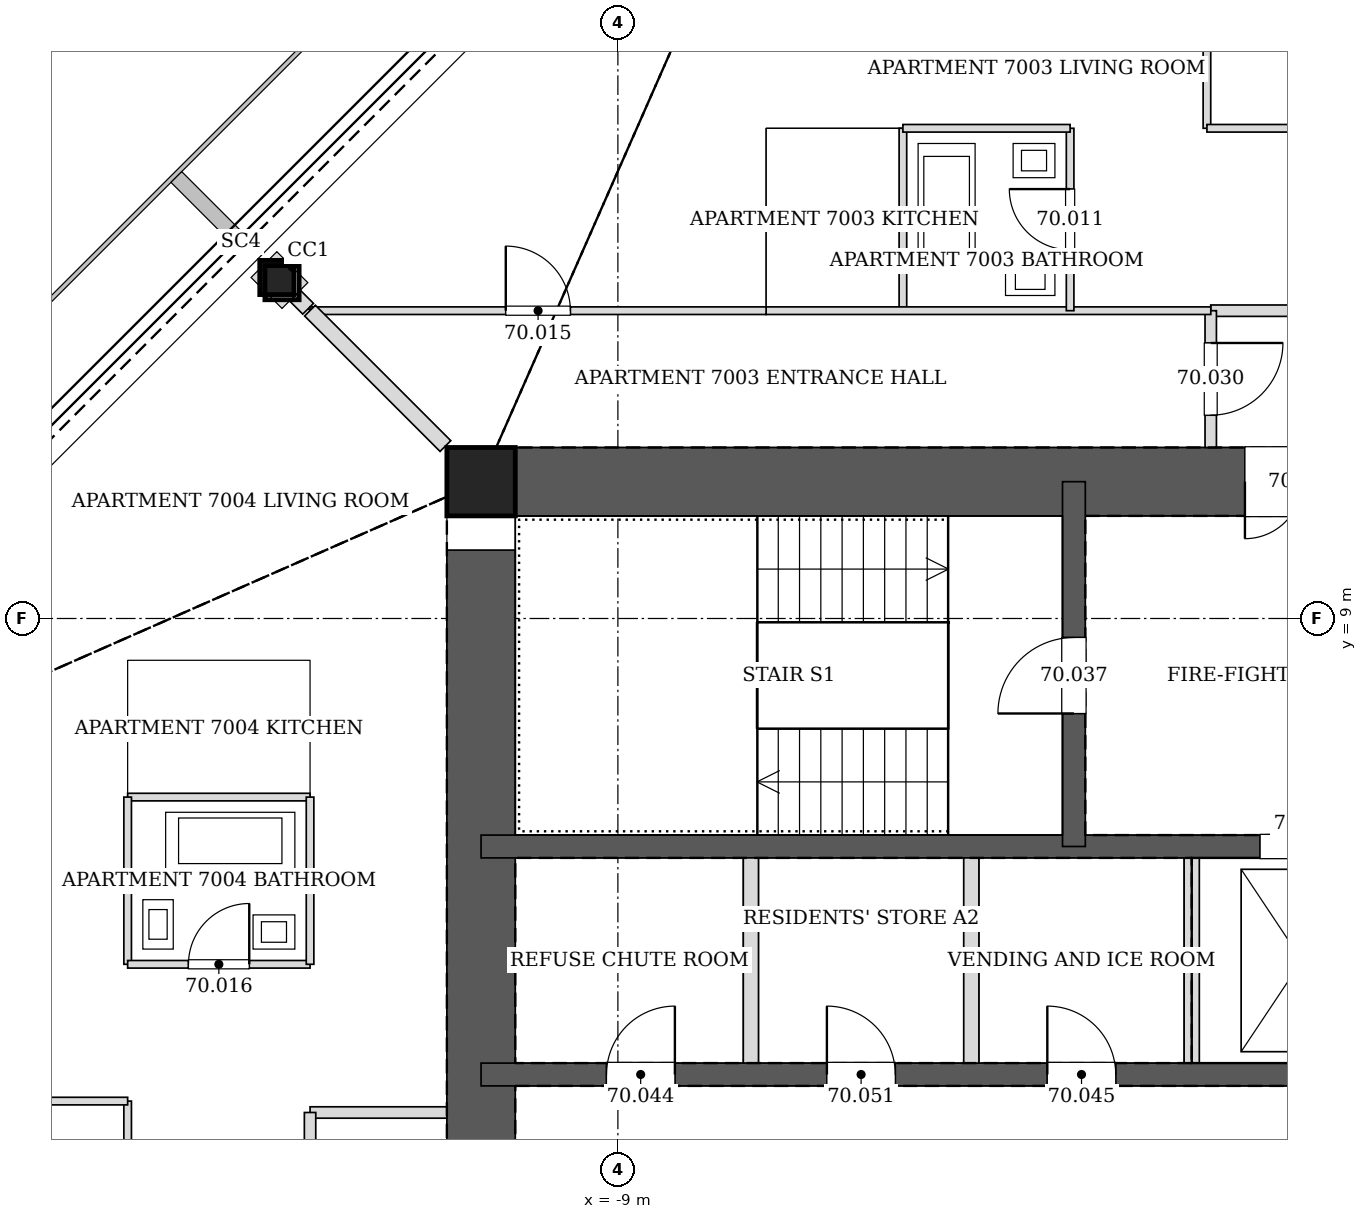
"""IFC4 building model, lengths in metres.
Left out: names, types, materials, properties, quantities, classifications, styles, units other than length and angle.
Written with IfcOpenShell. Run it as: python <this file> out.ifc"""

import sys

from ifc_helpers import new_model, si_unit, direction, frame, frame_2d, origin, origin_2d, place, context, subcontext, project, spatial, rectangle, hollow_rectangle, extrude, element, fill, save


model = new_model("IFC4")
c1 = context("Model", 3, precision=1e-05, world=origin(), true_north=direction((0.0, 1.0)))
c2 = subcontext(c1, "Body", "Model", "MODEL_VIEW")
j1 = project(units=[si_unit("LENGTHUNIT", "METRE"), si_unit("PLANEANGLEUNIT", "RADIAN")], contexts=[c1])
p1 = place(None, origin())
s1 = spatial("IfcSite", under=j1, at=p1, CompositionType="ELEMENT")
p2 = place(p1, origin())
s2 = spatial("IfcBuilding", under=s1, at=p2, CompositionType="ELEMENT")
p3 = place(p2, frame((0.0, 0.0, 287.8)))
s3 = spatial("IfcBuildingStorey", under=s2, at=p3, CompositionType="ELEMENT", Elevation=287.8)
p4 = place(p3, frame((-13.487, 13.487, 0.0), z_axis=(0.01995470925, -0.01995470925, 0.999601730269), x_axis=(0.707106781187, 0.707106781187, 0.0)))
e1 = element("IfcColumn", 1, at=p4, inside=s3, PredefinedType="COLUMN", context=c2, shape_type="SweptSolid", body=[
    extrude(hollow_rectangle(XDim=0.45, YDim=0.45, WallThickness=0.02, at=origin_2d()), origin(), (0.0, 0.0, 1.0), 3.401),
])
p5 = place(p3, frame((-10.8, 10.8, 0.0), z_axis=(0.0, 0.0, 1.0), x_axis=(1.0, 0.0, 0.0)))
e2 = element("IfcColumn", 2, at=p5, inside=s3, PredefinedType="COLUMN", context=c2, shape_type="SweptSolid", body=[
    extrude(hollow_rectangle(XDim=0.9, YDim=0.9, WallThickness=0.04, at=origin_2d()), origin(), (0.0, 0.0, 1.0), 3.4),
])
p6 = place(p3, frame((10.8, 10.8, 0.0), z_axis=(0.0, 0.0, 1.0), x_axis=(-1.0, 0.0, 0.0)))
e3 = element("IfcWall", 3, at=p6, inside=s3, PredefinedType="SOLIDWALL", context=c2, shape_type="SweptSolid", body=[
    extrude(rectangle(XDim=21.6, YDim=0.9, at=frame_2d((10.8, 0.0))), origin(), (0.0, 0.0, 1.0), 3.4),
])
p7 = place(p6, frame((10.05, 0.0, 0.0)))
e4 = element("IfcOpeningElement", 4, at=p7, cuts=e3, PredefinedType="OPENING", context=c2, shape_type="SweptSolid", body=[
    extrude(rectangle(XDim=1.5, YDim=2.1, at=frame_2d((0.75, 1.05))), frame((0.0, 0.46, 0.0), z_axis=(0.0, -1.0, 0.0), x_axis=(1.0, 0.0, 0.0)), (0.0, 0.0, 1.0), 0.92),
])
p8 = place(p3, frame((-10.8, 10.8, 0.0), z_axis=(0.0, 0.0, 1.0), x_axis=(0.0, -1.0, 0.0)))
e5 = element("IfcWall", 5, at=p8, inside=s3, PredefinedType="SOLIDWALL", context=c2, shape_type="SweptSolid", body=[
    extrude(rectangle(XDim=21.6, YDim=0.9, at=frame_2d((10.8, 0.0))), origin(), (0.0, 0.0, 1.0), 3.4),
])
p9 = place(p8, frame((8.7, 0.0, 0.0)))
e6 = element("IfcOpeningElement", 6, at=p9, cuts=e5, PredefinedType="OPENING", context=c2, shape_type="SweptSolid", body=[
    extrude(rectangle(XDim=1.2, YDim=2.1, at=frame_2d((0.6, 1.05))), frame((0.0, 0.46, 0.0), z_axis=(0.0, -1.0, 0.0), x_axis=(1.0, 0.0, 0.0)), (0.0, 0.0, 1.0), 0.92),
])
p10 = place(p8, frame((11.7, 0.0, 0.0)))
e7 = element("IfcOpeningElement", 7, at=p10, cuts=e5, PredefinedType="OPENING", context=c2, shape_type="SweptSolid", body=[
    extrude(rectangle(XDim=1.2, YDim=2.1, at=frame_2d((0.6, 1.05))), frame((0.0, 0.46, 0.0), z_axis=(0.0, -1.0, 0.0), x_axis=(1.0, 0.0, 0.0)), (0.0, 0.0, 1.0), 0.92),
])
p11 = place(p3, frame((-10.8, 3.0, 0.0), z_axis=(0.0, 0.0, 1.0), x_axis=(1.0, 0.0, 0.0)))
e8 = element("IfcWall", 8, at=p11, inside=s3, PredefinedType="SOLIDWALL", context=c2, shape_type="SweptSolid", body=[
    extrude(rectangle(XDim=21.6, YDim=0.3, at=frame_2d((10.8, 0.0))), origin(), (0.0, 0.0, 1.0), 3.4),
])
p12 = place(p11, frame((1.65, 0.0, 0.0)))
e9 = element("IfcOpeningElement", 9, at=p12, cuts=e8, PredefinedType="OPENING", context=c2, shape_type="SweptSolid", body=[
    extrude(rectangle(XDim=0.9, YDim=2.1, at=frame_2d((0.45, 1.05))), frame((0.0, 0.16, 0.0), z_axis=(0.0, -1.0, 0.0), x_axis=(1.0, 0.0, 0.0)), (0.0, 0.0, 1.0), 0.32),
])
p13 = place(p11, frame((7.45, 0.0, 0.0)))
e10 = element("IfcOpeningElement", 10, at=p13, cuts=e8, PredefinedType="OPENING", context=c2, shape_type="SweptSolid", body=[
    extrude(rectangle(XDim=0.9, YDim=2.1, at=frame_2d((0.45, 1.05))), frame((0.0, 0.16, 0.0), z_axis=(0.0, -1.0, 0.0), x_axis=(1.0, 0.0, 0.0)), (0.0, 0.0, 1.0), 0.32),
])
p14 = place(p11, frame((13.25, 0.0, 0.0)))
e11 = element("IfcOpeningElement", 11, at=p14, cuts=e8, PredefinedType="OPENING", context=c2, shape_type="SweptSolid", body=[
    extrude(rectangle(XDim=0.9, YDim=2.1, at=frame_2d((0.45, 1.05))), frame((0.0, 0.16, 0.0), z_axis=(0.0, -1.0, 0.0), x_axis=(1.0, 0.0, 0.0)), (0.0, 0.0, 1.0), 0.32),
])
p15 = place(p11, frame((16.15, 0.0, 0.0)))
e12 = element("IfcOpeningElement", 12, at=p15, cuts=e8, PredefinedType="OPENING", context=c2, shape_type="SweptSolid", body=[
    extrude(rectangle(XDim=0.9, YDim=2.1, at=frame_2d((0.45, 1.05))), frame((0.0, 0.16, 0.0), z_axis=(0.0, -1.0, 0.0), x_axis=(1.0, 0.0, 0.0)), (0.0, 0.0, 1.0), 0.32),
])
p16 = place(p11, frame((19.05, 0.0, 0.0)))
e13 = element("IfcOpeningElement", 13, at=p16, cuts=e8, PredefinedType="OPENING", context=c2, shape_type="SweptSolid", body=[
    extrude(rectangle(XDim=0.9, YDim=2.1, at=frame_2d((0.45, 1.05))), frame((0.0, 0.16, 0.0), z_axis=(0.0, -1.0, 0.0), x_axis=(1.0, 0.0, 0.0)), (0.0, 0.0, 1.0), 0.32),
])
p17 = place(p11, frame((4.55, 0.0, 0.0)))
e14 = element("IfcOpeningElement", 14, at=p17, cuts=e8, PredefinedType="OPENING", context=c2, shape_type="SweptSolid", body=[
    extrude(rectangle(XDim=0.9, YDim=2.1, at=frame_2d((0.45, 1.05))), frame((0.0, 0.16, 0.0), z_axis=(0.0, -1.0, 0.0), x_axis=(1.0, 0.0, 0.0)), (0.0, 0.0, 1.0), 0.32),
])
p18 = place(p3, frame((-10.8, 6.0, 0.0), z_axis=(0.0, 0.0, 1.0), x_axis=(1.0, 0.0, 0.0)))
e15 = element("IfcWall", 15, at=p18, inside=s3, PredefinedType="SOLIDWALL", context=c2, shape_type="SweptSolid", body=[
    extrude(rectangle(XDim=21.6, YDim=0.3, at=frame_2d((10.8, 0.0))), origin(), (0.0, 0.0, 1.0), 3.4),
])
p19 = place(p18, frame((10.25, 0.0, 0.0)))
e16 = element("IfcOpeningElement", 16, at=p19, cuts=e15, PredefinedType="OPENING", context=c2, shape_type="SweptSolid", body=[
    extrude(rectangle(XDim=1.1, YDim=2.1, at=frame_2d((0.55, 1.05))), frame((0.0, 0.16, 0.0), z_axis=(0.0, -1.0, 0.0), x_axis=(1.0, 0.0, 0.0)), (0.0, 0.0, 1.0), 0.32),
])
p20 = place(p3, frame((-3.0, 6.0, 0.0), z_axis=(0.0, 0.0, 1.0), x_axis=(0.0, 1.0, 0.0)))
e17 = element("IfcWall", 17, at=p20, inside=s3, PredefinedType="SOLIDWALL", context=c2, shape_type="SweptSolid", body=[
    extrude(rectangle(XDim=4.8, YDim=0.3, at=frame_2d((2.4, 0.0))), origin(), (0.0, 0.0, 1.0), 3.4),
])
p21 = place(p20, frame((1.75, 0.0, 0.0)))
e18 = element("IfcOpeningElement", 18, at=p21, cuts=e17, PredefinedType="OPENING", context=c2, shape_type="SweptSolid", body=[
    extrude(rectangle(XDim=1.0, YDim=2.1, at=frame_2d((0.5, 1.05))), frame((0.0, 0.16, 0.0), z_axis=(0.0, -1.0, 0.0), x_axis=(1.0, 0.0, 0.0)), (0.0, 0.0, 1.0), 0.32),
])
p22 = place(p3, frame((6.751, 13.05, 0.0), z_axis=(0.0, 0.0, 1.0), x_axis=(-1.0, 0.0, 0.0)))
e19 = element("IfcWall", 19, at=p22, inside=s3, PredefinedType="PARTITIONING", context=c2, shape_type="SweptSolid", body=[
    extrude(rectangle(XDim=7.951, YDim=0.15, at=frame_2d((3.976, 0.0))), origin(), (0.0, 0.0, 1.0), 2.349),
])
p23 = place(p3, frame((-1.2, 13.05, 0.0), z_axis=(0.0, 0.0, 1.0), x_axis=(0.0, -1.0, 0.0)))
e20 = element("IfcWall", 20, at=p23, inside=s3, PredefinedType="PARTITIONING", context=c2, shape_type="SweptSolid", body=[
    extrude(rectangle(XDim=1.8, YDim=0.15, at=frame_2d((0.9, 0.0))), origin(), (0.0, 0.0, 1.0), 3.2),
])
p24 = place(p23, frame((0.425, 0.0, 0.0)))
e21 = element("IfcOpeningElement", 21, at=p24, cuts=e20, PredefinedType="OPENING", context=c2, shape_type="SweptSolid", body=[
    extrude(rectangle(XDim=0.95, YDim=2.1, at=frame_2d((0.475, 1.05))), frame((0.0, 0.085, 0.0), z_axis=(0.0, -1.0, 0.0), x_axis=(1.0, 0.0, 0.0)), (0.0, 0.0, 1.0), 0.17),
])
p25 = place(p3, frame((-11.25, 2.5, 0.0), z_axis=(0.0, 0.0, 1.0), x_axis=(-1.0, 0.0, 0.0)))
e22 = element("IfcWall", 22, at=p25, inside=s3, PredefinedType="PARTITIONING", context=c2, shape_type="SweptSolid", body=[
    extrude(rectangle(XDim=1.8, YDim=0.15, at=frame_2d((0.9, 0.0))), origin(), (0.0, 0.0, 1.0), 3.2),
])
p26 = place(p3, frame((-13.05, 2.5, 0.0), z_axis=(0.0, 0.0, 1.0), x_axis=(0.0, -1.0, 0.0)))
e23 = element("IfcWall", 23, at=p26, inside=s3, PredefinedType="PARTITIONING", context=c2, shape_type="SweptSolid", body=[
    extrude(rectangle(XDim=3.251, YDim=0.15, at=frame_2d((1.625, 0.0))), origin(), (0.0, 0.0, 1.0), 2.349),
])
p27 = place(p26, frame((1.15, 0.0, 0.0)))
e24 = element("IfcOpeningElement", 24, at=p27, cuts=e23, PredefinedType="OPENING", context=c2, shape_type="SweptSolid", body=[
    extrude(rectangle(XDim=0.95, YDim=2.1, at=frame_2d((0.475, 1.05))), frame((0.0, 0.085, 0.0), z_axis=(0.0, -1.0, 0.0), x_axis=(1.0, 0.0, 0.0)), (0.0, 0.0, 1.0), 0.17),
])
p28 = place(p3, frame((-5.25, 13.05, 0.0), z_axis=(0.0, 0.0, 1.0), x_axis=(0.0, 1.0, 0.0)))
e25 = element("IfcWall", 25, at=p28, inside=s3, PredefinedType="PARTITIONING", context=c2, shape_type="SweptSolid", body=[
    extrude(rectangle(XDim=2.4, YDim=0.1, at=frame_2d((1.2, 0.0))), origin(), (0.0, 0.0, 1.0), 2.591),
])
p29 = place(p3, frame((-7.05, 13.05, 0.0), z_axis=(0.0, 0.0, 1.0), x_axis=(1.0, 0.0, 0.0)))
e26 = element("IfcWall", 26, at=p29, inside=s3, PredefinedType="PARTITIONING", context=c2, shape_type="SweptSolid", body=[
    extrude(rectangle(XDim=5.851, YDim=0.1, at=frame_2d((2.926, 0.0))), origin(), (0.0, 0.0, 1.0), 3.2),
])
p30 = place(p3, frame((-3.05, 13.05, 0.0), z_axis=(0.0, 0.0, 1.0), x_axis=(0.0, 1.0, 0.0)))
e27 = element("IfcWall", 27, at=p30, inside=s3, PredefinedType="PARTITIONING", context=c2, shape_type="SweptSolid", body=[
    extrude(rectangle(XDim=2.4, YDim=0.1, at=frame_2d((1.2, 0.0))), origin(), (0.0, 0.0, 1.0), 2.591),
])
p31 = place(p30, frame((0.8, 0.0, 0.0)))
e28 = element("IfcOpeningElement", 28, at=p31, cuts=e27, PredefinedType="OPENING", context=c2, shape_type="SweptSolid", body=[
    extrude(rectangle(XDim=0.8, YDim=2.1, at=frame_2d((0.4, 1.05))), frame((0.0, 0.06, 0.0), z_axis=(0.0, -1.0, 0.0), x_axis=(1.0, 0.0, 0.0)), (0.0, 0.0, 1.0), 0.12),
])
p32 = place(p3, frame((-3.05, 15.45, 0.0), z_axis=(0.0, 0.0, 1.0), x_axis=(-1.0, 0.0, 0.0)))
e29 = element("IfcWall", 29, at=p32, inside=s3, PredefinedType="PARTITIONING", context=c2, shape_type="SweptSolid", body=[
    extrude(rectangle(XDim=2.2, YDim=0.1, at=frame_2d((1.1, 0.0))), origin(), (0.0, 0.0, 1.0), 3.2),
])
p33 = place(p3, frame((-1.25, 19.855, 0.0), z_axis=(0.0, 0.0, 1.0), x_axis=(0.0, -1.0, 0.0)))
e30 = element("IfcWall", 30, at=p33, inside=s3, PredefinedType="PARTITIONING", context=c2, shape_type="SweptSolid", body=[
    extrude(rectangle(XDim=4.405, YDim=0.1, at=frame_2d((2.203, 0.0))), origin(), (0.0, 0.0, 1.0), 2.73),
])
p34 = place(p3, frame((-1.25, 15.45, 0.0), z_axis=(0.0, 0.0, 1.0), x_axis=(1.0, 0.0, 0.0)))
e31 = element("IfcWall", 31, at=p34, inside=s3, PredefinedType="PARTITIONING", context=c2, shape_type="SweptSolid", body=[
    extrude(rectangle(XDim=4.0, YDim=0.1, at=frame_2d((2.0, 0.0))), origin(), (0.0, 0.0, 1.0), 2.349),
])
p35 = place(p34, frame((1.575, 0.0, 0.0)))
e32 = element("IfcOpeningElement", 32, at=p35, cuts=e31, PredefinedType="OPENING", context=c2, shape_type="SweptSolid", body=[
    extrude(rectangle(XDim=0.85, YDim=2.1, at=frame_2d((0.425, 1.05))), frame((0.0, 0.06, 0.0), z_axis=(0.0, -1.0, 0.0), x_axis=(1.0, 0.0, 0.0)), (0.0, 0.0, 1.0), 0.12),
])
p36 = place(p3, frame((-13.246, 13.246, 0.0), z_axis=(0.0, 0.0, 1.0), x_axis=(0.707106781187, -0.707106781187, 0.0)))
e33 = element("IfcWall", 33, at=p36, inside=s3, PredefinedType="PARTITIONING", context=c2, shape_type="SweptSolid", body=[
    extrude(rectangle(XDim=0.241, YDim=0.2, at=frame_2d((0.121, 0.0))), origin(), (0.0, 0.0, 1.0), 2.591),
])
p37 = place(p3, frame((-13.05, 13.05, 0.0), z_axis=(0.0, 0.0, 1.0), x_axis=(1.0, 0.0, 0.0)))
e34 = element("IfcWall", 34, at=p37, inside=s3, PredefinedType="PARTITIONING", context=c2, shape_type="SweptSolid", body=[
    extrude(rectangle(XDim=6.0, YDim=0.1, at=frame_2d((3.0, 0.0))), origin(), (0.0, 0.0, 1.0), 2.497),
])
p38 = place(p37, frame((2.575, 0.0, 0.0)))
e35 = element("IfcOpeningElement", 35, at=p38, cuts=e34, PredefinedType="OPENING", context=c2, shape_type="SweptSolid", body=[
    extrude(rectangle(XDim=0.85, YDim=2.1, at=frame_2d((0.425, 1.05))), frame((0.0, 0.06, 0.0), z_axis=(0.0, -1.0, 0.0), x_axis=(1.0, 0.0, 0.0)), (0.0, 0.0, 1.0), 0.12),
])
p39 = place(p3, frame((-15.45, 6.65, 0.0), z_axis=(0.0, 0.0, 1.0), x_axis=(1.0, 0.0, 0.0)))
e36 = element("IfcWall", 36, at=p39, inside=s3, PredefinedType="PARTITIONING", context=c2, shape_type="SweptSolid", body=[
    extrude(rectangle(XDim=2.4, YDim=0.1, at=frame_2d((1.2, 0.0))), origin(), (0.0, 0.0, 1.0), 2.591),
])
p40 = place(p3, frame((-15.45, 6.65, 0.0), z_axis=(0.0, 0.0, 1.0), x_axis=(0.0, -1.0, 0.0)))
e37 = element("IfcWall", 37, at=p40, inside=s3, PredefinedType="PARTITIONING", context=c2, shape_type="SweptSolid", body=[
    extrude(rectangle(XDim=2.2, YDim=0.1, at=frame_2d((1.1, 0.0))), origin(), (0.0, 0.0, 1.0), 3.2),
])
p41 = place(p3, frame((-15.45, 4.45, 0.0), z_axis=(0.0, 0.0, 1.0), x_axis=(1.0, 0.0, 0.0)))
e38 = element("IfcWall", 38, at=p41, inside=s3, PredefinedType="PARTITIONING", context=c2, shape_type="SweptSolid", body=[
    extrude(rectangle(XDim=2.4, YDim=0.1, at=frame_2d((1.2, 0.0))), origin(), (0.0, 0.0, 1.0), 2.591),
])
p42 = place(p41, frame((0.8, 0.0, 0.0)))
e39 = element("IfcOpeningElement", 39, at=p42, cuts=e38, PredefinedType="OPENING", context=c2, shape_type="SweptSolid", body=[
    extrude(rectangle(XDim=0.8, YDim=2.1, at=frame_2d((0.4, 1.05))), frame((0.0, 0.06, 0.0), z_axis=(0.0, -1.0, 0.0), x_axis=(1.0, 0.0, 0.0)), (0.0, 0.0, 1.0), 0.12),
])
p43 = place(p3, frame((-13.05, 4.45, 0.0), z_axis=(0.0, 0.0, 1.0), x_axis=(0.0, 1.0, 0.0)))
e40 = element("IfcWall", 40, at=p43, inside=s3, PredefinedType="PARTITIONING", context=c2, shape_type="SweptSolid", body=[
    extrude(rectangle(XDim=2.2, YDim=0.1, at=frame_2d((1.1, 0.0))), origin(), (0.0, 0.0, 1.0), 3.2),
])
p44 = place(p3, frame((-15.45, -0.75, 0.0), z_axis=(0.0, 0.0, 1.0), x_axis=(0.0, 1.0, 0.0)))
e41 = element("IfcWall", 41, at=p44, inside=s3, PredefinedType="PARTITIONING", context=c2, shape_type="SweptSolid", body=[
    extrude(rectangle(XDim=3.4, YDim=0.1, at=frame_2d((1.7, 0.0))), origin(), (0.0, 0.0, 1.0), 2.349),
])
p45 = place(p3, frame((-15.45, 2.65, 0.0), z_axis=(0.0, 0.0, 1.0), x_axis=(-1.0, 0.0, 0.0)))
e42 = element("IfcWall", 42, at=p45, inside=s3, PredefinedType="PARTITIONING", context=c2, shape_type="SweptSolid", body=[
    extrude(rectangle(XDim=4.407, YDim=0.1, at=frame_2d((2.204, 0.0))), origin(), (0.0, 0.0, 1.0), 2.73),
])
p46 = place(p45, frame((1.562, 0.0, 0.0)))
e43 = element("IfcOpeningElement", 43, at=p46, cuts=e42, PredefinedType="OPENING", context=c2, shape_type="SweptSolid", body=[
    extrude(rectangle(XDim=0.85, YDim=2.1, at=frame_2d((0.425, 1.05))), frame((0.0, 0.06, 0.0), z_axis=(0.0, -1.0, 0.0), x_axis=(1.0, 0.0, 0.0)), (0.0, 0.0, 1.0), 0.12),
])
p47 = place(p3, frame((-11.269, 11.269, 0.0), z_axis=(0.0, 0.0, 1.0), x_axis=(-0.707106781187, 0.707106781187, 0.0)))
e44 = element("IfcWall", 44, at=p47, inside=s3, PredefinedType="PARTITIONING", context=c2, shape_type="SweptSolid", body=[
    extrude(rectangle(XDim=2.52, YDim=0.2, at=frame_2d((1.26, 0.0))), origin(), (0.0, 0.0, 1.0), 2.591),
])
for number, where, z_axis, x_axis in (
    (45, (-7.25, 3.15, 0.0), (0.0, 0.0, 1.0), (0.0, 1.0, 0.0)),
    (46, (-4.35, 3.15, 0.0), (0.0, 0.0, 1.0), (0.0, 1.0, 0.0)),
    (47, (-1.45, 3.15, 0.0), (0.0, 0.0, 1.0), (0.0, 1.0, 0.0)),
):
    element("IfcWall", number, at=place(p3, frame(where, z_axis=z_axis, x_axis=x_axis)), inside=s3, PredefinedType="PARTITIONING", context=c2, shape_type="SweptSolid", body=[
        extrude(rectangle(XDim=2.7, YDim=0.2, at=frame_2d((1.35, 0.0))), origin(), (0.0, 0.0, 1.0), 3.2),
    ])
p48 = place(p31, origin())
e48 = element("IfcDoor", 48, at=p48, inside=s3, OperationType="SINGLE_SWING_RIGHT", PredefinedType="DOOR", context=c2, shape_type="SweptSolid", body=[
    extrude(rectangle(XDim=0.8, YDim=2.1, at=frame_2d((0.4, 1.05))), frame((0.0, 0.025, 0.0), z_axis=(0.0, -1.0, 0.0), x_axis=(1.0, 0.0, 0.0)), (0.0, 0.0, 1.0), 0.05),
])
fill(e28, e48)
p49 = place(p38, origin())
e49 = element("IfcDoor", 49, at=p49, inside=s3, OperationType="SINGLE_SWING_LEFT", PredefinedType="DOOR", context=c2, shape_type="SweptSolid", body=[
    extrude(rectangle(XDim=0.85, YDim=2.1, at=frame_2d((0.425, 1.05))), frame((0.0, 0.025, 0.0), z_axis=(0.0, -1.0, 0.0), x_axis=(1.0, 0.0, 0.0)), (0.0, 0.0, 1.0), 0.05),
])
fill(e35, e49)
p50 = place(p42, origin())
e50 = element("IfcDoor", 50, at=p50, inside=s3, OperationType="SINGLE_SWING_RIGHT", PredefinedType="DOOR", context=c2, shape_type="SweptSolid", body=[
    extrude(rectangle(XDim=0.8, YDim=2.1, at=frame_2d((0.4, 1.05))), frame((0.0, 0.025, 0.0), z_axis=(0.0, -1.0, 0.0), x_axis=(1.0, 0.0, 0.0)), (0.0, 0.0, 1.0), 0.05),
])
fill(e39, e50)
p51 = place(p24, origin())
e51 = element("IfcDoor", 51, at=p51, inside=s3, OperationType="SINGLE_SWING_LEFT", PredefinedType="DOOR", context=c2, shape_type="SweptSolid", body=[
    extrude(rectangle(XDim=0.95, YDim=2.1, at=frame_2d((0.475, 1.05))), frame((0.0, 0.025, 0.0), z_axis=(0.0, -1.0, 0.0), x_axis=(1.0, 0.0, 0.0)), (0.0, 0.0, 1.0), 0.05),
])
fill(e21, e51)
p52 = place(p7, origin())
e52 = element("IfcDoor", 52, at=p52, inside=s3, OperationType="DOUBLE_DOOR_SINGLE_SWING", PredefinedType="DOOR", context=c2, shape_type="SweptSolid", body=[
    extrude(rectangle(XDim=1.5, YDim=2.1, at=frame_2d((0.75, 1.05))), frame((0.0, 0.025, 0.0), z_axis=(0.0, -1.0, 0.0), x_axis=(1.0, 0.0, 0.0)), (0.0, 0.0, 1.0), 0.05),
])
fill(e4, e52)
p53 = place(p21, origin())
e53 = element("IfcDoor", 53, at=p53, inside=s3, OperationType="SINGLE_SWING_LEFT", PredefinedType="DOOR", context=c2, shape_type="SweptSolid", body=[
    extrude(rectangle(XDim=1.0, YDim=2.1, at=frame_2d((0.5, 1.05))), frame((0.0, 0.025, 0.0), z_axis=(0.0, -1.0, 0.0), x_axis=(1.0, 0.0, 0.0)), (0.0, 0.0, 1.0), 0.05),
])
fill(e18, e53)
p54 = place(p12, origin())
e54 = element("IfcDoor", 54, at=p54, inside=s3, OperationType="SINGLE_SWING_RIGHT", PredefinedType="DOOR", context=c2, shape_type="SweptSolid", body=[
    extrude(rectangle(XDim=0.9, YDim=2.1, at=frame_2d((0.45, 1.05))), frame((0.0, 0.025, 0.0), z_axis=(0.0, -1.0, 0.0), x_axis=(1.0, 0.0, 0.0)), (0.0, 0.0, 1.0), 0.05),
])
fill(e9, e54)
p55 = place(p13, origin())
e55 = element("IfcDoor", 55, at=p55, inside=s3, OperationType="SINGLE_SWING_LEFT", PredefinedType="DOOR", context=c2, shape_type="SweptSolid", body=[
    extrude(rectangle(XDim=0.9, YDim=2.1, at=frame_2d((0.45, 1.05))), frame((0.0, 0.025, 0.0), z_axis=(0.0, -1.0, 0.0), x_axis=(1.0, 0.0, 0.0)), (0.0, 0.0, 1.0), 0.05),
])
fill(e10, e55)
p56 = place(p17, origin())
e56 = element("IfcDoor", 56, at=p56, inside=s3, OperationType="SINGLE_SWING_LEFT", PredefinedType="DOOR", context=c2, shape_type="SweptSolid", body=[
    extrude(rectangle(XDim=0.9, YDim=2.1, at=frame_2d((0.45, 1.05))), frame((0.0, 0.025, 0.0), z_axis=(0.0, -1.0, 0.0), x_axis=(1.0, 0.0, 0.0)), (0.0, 0.0, 1.0), 0.05),
])
fill(e14, e56)
p57 = place(p19, origin())
e57 = element("IfcDoor", 57, at=p57, inside=s3, OperationType="DOUBLE_DOOR_SLIDING", PredefinedType="DOOR", context=c2, shape_type="SweptSolid", body=[
    extrude(rectangle(XDim=1.1, YDim=2.1, at=frame_2d((0.55, 1.05))), frame((0.0, 0.025, 0.0), z_axis=(0.0, -1.0, 0.0), x_axis=(1.0, 0.0, 0.0)), (0.0, 0.0, 1.0), 0.05),
])
fill(e16, e57)
save(model, sys.argv[1])
